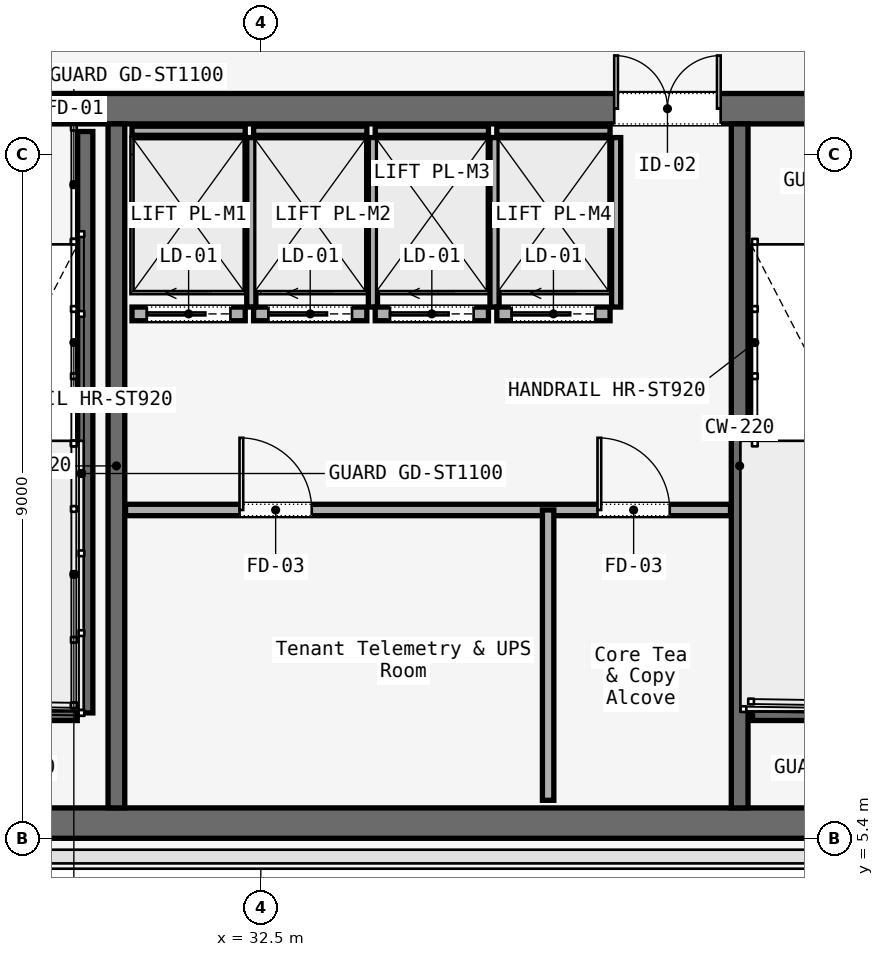
"""IFC4 building model, lengths in metres.
Left out: names, types, materials, properties, quantities, classifications, styles, units other than length and angle.
Written with IfcOpenShell. Run it as: python <this file> out.ifc"""

import sys

from ifc_helpers import new_model, si_unit, direction, frame, frame_2d, origin, place, context, subcontext, project, spatial, rectangle, extrude, element, fill, save


model = new_model("IFC4")
c1 = context("Model", 3, precision=1e-05, world=origin(), true_north=direction((0.0, 1.0)))
c2 = subcontext(c1, "Body", "Model", "MODEL_VIEW")
j1 = project(units=[si_unit("LENGTHUNIT", "METRE"), si_unit("PLANEANGLEUNIT", "RADIAN")], contexts=[c1])
p1 = place(None, origin())
s1 = spatial("IfcSite", under=j1, at=p1, CompositionType="ELEMENT")
p2 = place(p1, origin())
s2 = spatial("IfcBuilding", under=s1, at=p2, CompositionType="ELEMENT")
p3 = place(p2, frame((0.0, 0.0, 187.8)))
s3 = spatial("IfcBuildingStorey", under=s2, at=p3, CompositionType="ELEMENT", Elevation=187.8)
p4 = place(p3, frame((26.45, 15.0, 0.0), z_axis=(0.0, 0.0, 1.0), x_axis=(1.0, 0.0, 0.0)))
e1 = element("IfcWall", 1, at=p4, inside=s3, PredefinedType="SOLIDWALL", context=c2, shape_type="SweptSolid", body=[
    extrude(rectangle(XDim=31.1, YDim=0.4, at=frame_2d((15.55, 0.0))), origin(), (0.0, 0.0, 1.0), 3.58),
])
p5 = place(p4, frame((1.65, 0.0, 0.0)))
e2 = element("IfcOpeningElement", 2, at=p5, cuts=e1, PredefinedType="OPENING", context=c2, shape_type="SweptSolid", body=[
    extrude(rectangle(XDim=1.1, YDim=2.2, at=frame_2d((0.55, 1.1))), frame((0.0, 0.2, 0.0), z_axis=(0.0, -1.0, 0.0), x_axis=(1.0, 0.0, 0.0)), (0.0, 0.0, 1.0), 0.4),
])
p6 = place(p4, frame((13.65, 0.0, 0.0)))
e3 = element("IfcOpeningElement", 3, at=p6, cuts=e1, PredefinedType="OPENING", context=c2, shape_type="SweptSolid", body=[
    extrude(rectangle(XDim=1.1, YDim=2.2, at=frame_2d((0.55, 1.1))), frame((0.0, 0.2, 0.0), z_axis=(0.0, -1.0, 0.0), x_axis=(1.0, 0.0, 0.0)), (0.0, 0.0, 1.0), 0.4),
])
p7 = place(p4, frame((25.55, 0.0, 0.0)))
e4 = element("IfcOpeningElement", 4, at=p7, cuts=e1, PredefinedType="OPENING", context=c2, shape_type="SweptSolid", body=[
    extrude(rectangle(XDim=1.1, YDim=2.2, at=frame_2d((0.55, 1.1))), frame((0.0, 0.2, 0.0), z_axis=(0.0, -1.0, 0.0), x_axis=(1.0, 0.0, 0.0)), (0.0, 0.0, 1.0), 0.4),
])
p8 = place(p4, frame((10.7, 0.0, 0.0)))
e5 = element("IfcOpeningElement", 5, at=p8, cuts=e1, PredefinedType="OPENING", context=c2, shape_type="SweptSolid", body=[
    extrude(rectangle(XDim=1.4, YDim=2.2, at=frame_2d((0.7, 1.1))), frame((0.0, 0.2, 0.0), z_axis=(0.0, -1.0, 0.0), x_axis=(1.0, 0.0, 0.0)), (0.0, 0.0, 1.0), 0.4),
])
p9 = place(p4, frame((19.35, 0.0, 0.0)))
e6 = element("IfcOpeningElement", 6, at=p9, cuts=e1, PredefinedType="OPENING", context=c2, shape_type="SweptSolid", body=[
    extrude(rectangle(XDim=1.1, YDim=2.2, at=frame_2d((0.55, 1.1))), frame((0.0, 0.2, 0.0), z_axis=(0.0, -1.0, 0.0), x_axis=(1.0, 0.0, 0.0)), (0.0, 0.0, 1.0), 0.4),
])
p10 = place(p4, frame((21.4, 0.0, 0.0)))
e7 = element("IfcOpeningElement", 7, at=p10, cuts=e1, PredefinedType="OPENING", context=c2, shape_type="SweptSolid", body=[
    extrude(rectangle(XDim=0.9, YDim=2.1, at=frame_2d((0.45, 1.05))), frame((0.0, 0.2, 0.0), z_axis=(0.0, -1.0, 0.0), x_axis=(1.0, 0.0, 0.0)), (0.0, 0.0, 1.0), 0.4),
])
p11 = place(p4, frame((23.35, 0.0, 0.0)))
e8 = element("IfcOpeningElement", 8, at=p11, cuts=e1, PredefinedType="OPENING", context=c2, shape_type="SweptSolid", body=[
    extrude(rectangle(XDim=1.3, YDim=2.3, at=frame_2d((0.65, 1.15))), frame((0.0, 0.2, 0.0), z_axis=(0.0, -1.0, 0.0), x_axis=(1.0, 0.0, 0.0)), (0.0, 0.0, 1.0), 0.4),
])
p12 = place(p3, frame((26.45, 5.6, 0.0), z_axis=(0.0, 0.0, 1.0), x_axis=(1.0, 0.0, 0.0)))
e9 = element("IfcWall", 9, at=p12, inside=s3, PredefinedType="SOLIDWALL", context=c2, shape_type="SweptSolid", body=[
    extrude(rectangle(XDim=31.1, YDim=0.4, at=frame_2d((15.55, 0.0))), origin(), (0.0, 0.0, 1.0), 3.58),
])
for number, where, z_axis, x_axis in (
    (10, (30.6, 5.8, 0.0), (0.0, 0.0, 1.0), (0.0, 1.0, 0.0)),
    (11, (38.8, 5.8, 0.0), (0.0, 0.0, 1.0), (0.0, 1.0, 0.0)),
):
    element("IfcWall", number, at=place(p3, frame(where, z_axis=z_axis, x_axis=x_axis)), inside=s3, PredefinedType="SOLIDWALL", context=c2, shape_type="SweptSolid", body=[
        extrude(rectangle(XDim=9.0, YDim=0.22, at=frame_2d((4.5, 0.0))), origin(), (0.0, 0.0, 1.0), 3.58),
    ])
p13 = place(p3, frame((30.19, 14.7, 0.0), z_axis=(0.0, 0.0, 1.0), x_axis=(0.0, -1.0, 0.0)))
e12 = element("IfcWall", 12, at=p13, inside=s3, PredefinedType="SOLIDWALL", context=c2, shape_type="SweptSolid", body=[
    extrude(rectangle(XDim=7.65, YDim=0.2, at=frame_2d((3.825, 0.0))), origin(), (0.0, 0.0, 1.0), 3.8),
])
for number, where, z_axis, x_axis in (
    (13, (26.97, 7.05, 0.0), (0.0, 0.0, 1.0), (1.0, 0.0, 0.0)),
    (14, (38.97, 7.05, 0.0), (0.0, 0.0, 1.0), (1.0, 0.0, 0.0)),
):
    element("IfcWall", number, at=place(p3, frame(where, z_axis=z_axis, x_axis=x_axis)), inside=s3, PredefinedType="SOLIDWALL", context=c2, shape_type="SweptSolid", body=[
        extrude(rectangle(XDim=3.115, YDim=0.2, at=frame_2d((1.558, 0.0))), origin(), (0.0, 0.0, 1.0), 3.8),
    ])
p14 = place(p3, frame((30.72, 9.72, 0.0), z_axis=(0.0, 0.0, 1.0), x_axis=(1.0, 0.0, 0.0)))
e15 = element("IfcWall", 15, at=p14, inside=s3, PredefinedType="PARTITIONING", context=c2, shape_type="SweptSolid", body=[
    extrude(rectangle(XDim=7.96, YDim=0.15, at=frame_2d((3.98, 0.0))), origin(), (0.0, 0.0, 1.0), 3.01),
])
p15 = place(p14, frame((1.5, 0.0, 0.0)))
e16 = element("IfcOpeningElement", 16, at=p15, cuts=e15, PredefinedType="OPENING", context=c2, shape_type="SweptSolid", body=[
    extrude(rectangle(XDim=0.95, YDim=2.2, at=frame_2d((0.475, 1.1))), frame((0.0, 0.075, 0.0), z_axis=(0.0, -1.0, 0.0), x_axis=(1.0, 0.0, 0.0)), (0.0, 0.0, 1.0), 0.15),
])
p16 = place(p14, frame((6.21, 0.0, 0.0)))
e17 = element("IfcOpeningElement", 17, at=p16, cuts=e15, PredefinedType="OPENING", context=c2, shape_type="SweptSolid", body=[
    extrude(rectangle(XDim=0.95, YDim=2.2, at=frame_2d((0.475, 1.1))), frame((0.0, 0.075, 0.0), z_axis=(0.0, -1.0, 0.0), x_axis=(1.0, 0.0, 0.0)), (0.0, 0.0, 1.0), 0.15),
])
p17 = place(p3, frame((36.28, 5.9, 0.0), z_axis=(0.0, 0.0, 1.0), x_axis=(0.0, 1.0, 0.0)))
e18 = element("IfcWall", 18, at=p17, inside=s3, PredefinedType="PARTITIONING", context=c2, shape_type="SweptSolid", body=[
    extrude(rectangle(XDim=3.82, YDim=0.15, at=frame_2d((1.91, 0.0))), origin(), (0.0, 0.0, 1.0), 3.01),
])
p18 = place(p3, frame((30.805, 12.3, 0.0), z_axis=(0.0, 0.0, 1.0), x_axis=(1.0, 0.0, 0.0)))
e19 = element("IfcWall", 19, at=p18, inside=s3, PredefinedType="SOLIDWALL", context=c2, shape_type="SweptSolid", body=[
    extrude(rectangle(XDim=1.49, YDim=0.18, at=frame_2d((0.745, 0.0))), origin(), (0.0, 0.0, 1.0), 3.01),
])
p19 = place(p18, frame((0.195, 0.0, 0.0)))
e20 = element("IfcOpeningElement", 20, at=p19, cuts=e19, PredefinedType="OPENING", context=c2, shape_type="SweptSolid", body=[
    extrude(rectangle(XDim=1.1, YDim=2.2, at=frame_2d((0.55, 1.1))), frame((0.0, 0.09, 0.0), z_axis=(0.0, -1.0, 0.0), x_axis=(1.0, 0.0, 0.0)), (0.0, 0.0, 1.0), 0.18),
])
p20 = place(p3, frame((30.805, 14.71, 0.0), z_axis=(0.0, 0.0, 1.0), x_axis=(1.0, 0.0, 0.0)))
e21 = element("IfcWall", 21, at=p20, inside=s3, PredefinedType="SOLIDWALL", context=c2, shape_type="SweptSolid", body=[
    extrude(rectangle(XDim=1.49, YDim=0.12, at=frame_2d((0.745, 0.0))), origin(), (0.0, 0.0, 1.0), 3.01),
])
p21 = place(p3, frame((32.375, 12.39, 0.0), z_axis=(0.0, 0.0, 1.0), x_axis=(0.0, 1.0, 0.0)))
e22 = element("IfcWall", 22, at=p21, inside=s3, PredefinedType="SOLIDWALL", context=c2, shape_type="SweptSolid", body=[
    extrude(rectangle(XDim=2.23, YDim=0.12, at=frame_2d((1.115, 0.0))), origin(), (0.0, 0.0, 1.0), 3.01),
])
p22 = place(p3, frame((32.405, 12.3, 0.0), z_axis=(0.0, 0.0, 1.0), x_axis=(1.0, 0.0, 0.0)))
e23 = element("IfcWall", 23, at=p22, inside=s3, PredefinedType="SOLIDWALL", context=c2, shape_type="SweptSolid", body=[
    extrude(rectangle(XDim=1.49, YDim=0.18, at=frame_2d((0.745, 0.0))), origin(), (0.0, 0.0, 1.0), 3.01),
])
p23 = place(p22, frame((0.195, 0.0, 0.0)))
e24 = element("IfcOpeningElement", 24, at=p23, cuts=e23, PredefinedType="OPENING", context=c2, shape_type="SweptSolid", body=[
    extrude(rectangle(XDim=1.1, YDim=2.2, at=frame_2d((0.55, 1.1))), frame((0.0, 0.09, 0.0), z_axis=(0.0, -1.0, 0.0), x_axis=(1.0, 0.0, 0.0)), (0.0, 0.0, 1.0), 0.18),
])
p24 = place(p3, frame((32.405, 14.71, 0.0), z_axis=(0.0, 0.0, 1.0), x_axis=(1.0, 0.0, 0.0)))
e25 = element("IfcWall", 25, at=p24, inside=s3, PredefinedType="SOLIDWALL", context=c2, shape_type="SweptSolid", body=[
    extrude(rectangle(XDim=1.49, YDim=0.12, at=frame_2d((0.745, 0.0))), origin(), (0.0, 0.0, 1.0), 3.01),
])
p25 = place(p3, frame((33.975, 12.39, 0.0), z_axis=(0.0, 0.0, 1.0), x_axis=(0.0, 1.0, 0.0)))
e26 = element("IfcWall", 26, at=p25, inside=s3, PredefinedType="SOLIDWALL", context=c2, shape_type="SweptSolid", body=[
    extrude(rectangle(XDim=2.23, YDim=0.12, at=frame_2d((1.115, 0.0))), origin(), (0.0, 0.0, 1.0), 3.01),
])
p26 = place(p3, frame((34.005, 12.3, 0.0), z_axis=(0.0, 0.0, 1.0), x_axis=(1.0, 0.0, 0.0)))
e27 = element("IfcWall", 27, at=p26, inside=s3, PredefinedType="SOLIDWALL", context=c2, shape_type="SweptSolid", body=[
    extrude(rectangle(XDim=1.49, YDim=0.18, at=frame_2d((0.745, 0.0))), origin(), (0.0, 0.0, 1.0), 3.01),
])
p27 = place(p26, frame((0.195, 0.0, 0.0)))
e28 = element("IfcOpeningElement", 28, at=p27, cuts=e27, PredefinedType="OPENING", context=c2, shape_type="SweptSolid", body=[
    extrude(rectangle(XDim=1.1, YDim=2.2, at=frame_2d((0.55, 1.1))), frame((0.0, 0.09, 0.0), z_axis=(0.0, -1.0, 0.0), x_axis=(1.0, 0.0, 0.0)), (0.0, 0.0, 1.0), 0.18),
])
p28 = place(p3, frame((34.005, 14.71, 0.0), z_axis=(0.0, 0.0, 1.0), x_axis=(1.0, 0.0, 0.0)))
e29 = element("IfcWall", 29, at=p28, inside=s3, PredefinedType="SOLIDWALL", context=c2, shape_type="SweptSolid", body=[
    extrude(rectangle(XDim=1.49, YDim=0.12, at=frame_2d((0.745, 0.0))), origin(), (0.0, 0.0, 1.0), 3.01),
])
p29 = place(p3, frame((35.575, 12.39, 0.0), z_axis=(0.0, 0.0, 1.0), x_axis=(0.0, 1.0, 0.0)))
e30 = element("IfcWall", 30, at=p29, inside=s3, PredefinedType="SOLIDWALL", context=c2, shape_type="SweptSolid", body=[
    extrude(rectangle(XDim=2.23, YDim=0.12, at=frame_2d((1.115, 0.0))), origin(), (0.0, 0.0, 1.0), 3.01),
])
p30 = place(p3, frame((35.605, 12.3, 0.0), z_axis=(0.0, 0.0, 1.0), x_axis=(1.0, 0.0, 0.0)))
e31 = element("IfcWall", 31, at=p30, inside=s3, PredefinedType="SOLIDWALL", context=c2, shape_type="SweptSolid", body=[
    extrude(rectangle(XDim=1.49, YDim=0.18, at=frame_2d((0.745, 0.0))), origin(), (0.0, 0.0, 1.0), 3.01),
])
p31 = place(p30, frame((0.195, 0.0, 0.0)))
e32 = element("IfcOpeningElement", 32, at=p31, cuts=e31, PredefinedType="OPENING", context=c2, shape_type="SweptSolid", body=[
    extrude(rectangle(XDim=1.1, YDim=2.2, at=frame_2d((0.55, 1.1))), frame((0.0, 0.09, 0.0), z_axis=(0.0, -1.0, 0.0), x_axis=(1.0, 0.0, 0.0)), (0.0, 0.0, 1.0), 0.18),
])
p32 = place(p3, frame((35.605, 14.71, 0.0), z_axis=(0.0, 0.0, 1.0), x_axis=(1.0, 0.0, 0.0)))
e33 = element("IfcWall", 33, at=p32, inside=s3, PredefinedType="SOLIDWALL", context=c2, shape_type="SweptSolid", body=[
    extrude(rectangle(XDim=1.49, YDim=0.12, at=frame_2d((0.745, 0.0))), origin(), (0.0, 0.0, 1.0), 3.01),
])
p33 = place(p3, frame((37.175, 12.39, 0.0), z_axis=(0.0, 0.0, 1.0), x_axis=(0.0, 1.0, 0.0)))
e34 = element("IfcWall", 34, at=p33, inside=s3, PredefinedType="SOLIDWALL", context=c2, shape_type="SweptSolid", body=[
    extrude(rectangle(XDim=2.23, YDim=0.12, at=frame_2d((1.115, 0.0))), origin(), (0.0, 0.0, 1.0), 3.01),
])
p34 = place(p8, origin())
e35 = element("IfcDoor", 35, at=p34, inside=s3, OperationType="DOUBLE_DOOR_SINGLE_SWING", PredefinedType="DOOR", context=c2, shape_type="SweptSolid", body=[
    extrude(rectangle(XDim=1.4, YDim=2.2, at=frame_2d((0.7, 1.1))), frame((0.0, 0.025, 0.0), z_axis=(0.0, -1.0, 0.0), x_axis=(1.0, 0.0, 0.0)), (0.0, 0.0, 1.0), 0.05),
])
fill(e5, e35)
p35 = place(p15, origin())
e36 = element("IfcDoor", 36, at=p35, inside=s3, OperationType="SINGLE_SWING_LEFT", PredefinedType="DOOR", context=c2, shape_type="SweptSolid", body=[
    extrude(rectangle(XDim=0.95, YDim=2.2, at=frame_2d((0.475, 1.1))), frame((0.0, 0.025, 0.0), z_axis=(0.0, -1.0, 0.0), x_axis=(1.0, 0.0, 0.0)), (0.0, 0.0, 1.0), 0.05),
])
fill(e16, e36)
p36 = place(p16, origin())
e37 = element("IfcDoor", 37, at=p36, inside=s3, OperationType="SINGLE_SWING_RIGHT", PredefinedType="DOOR", context=c2, shape_type="SweptSolid", body=[
    extrude(rectangle(XDim=0.95, YDim=2.2, at=frame_2d((0.475, 1.1))), frame((0.0, 0.025, 0.0), z_axis=(0.0, -1.0, 0.0), x_axis=(1.0, 0.0, 0.0)), (0.0, 0.0, 1.0), 0.05),
])
fill(e17, e37)
p37 = place(p19, origin())
e38 = element("IfcDoor", 38, at=p37, inside=s3, OperationType="SLIDING_TO_LEFT", PredefinedType="DOOR", context=c2, shape_type="SweptSolid", body=[
    extrude(rectangle(XDim=1.1, YDim=2.2, at=frame_2d((0.55, 1.1))), frame((0.0, 0.025, 0.0), z_axis=(0.0, -1.0, 0.0), x_axis=(1.0, 0.0, 0.0)), (0.0, 0.0, 1.0), 0.05),
])
fill(e20, e38)
p38 = place(p23, origin())
e39 = element("IfcDoor", 39, at=p38, inside=s3, OperationType="SLIDING_TO_LEFT", PredefinedType="DOOR", context=c2, shape_type="SweptSolid", body=[
    extrude(rectangle(XDim=1.1, YDim=2.2, at=frame_2d((0.55, 1.1))), frame((0.0, 0.025, 0.0), z_axis=(0.0, -1.0, 0.0), x_axis=(1.0, 0.0, 0.0)), (0.0, 0.0, 1.0), 0.05),
])
fill(e24, e39)
p39 = place(p27, origin())
e40 = element("IfcDoor", 40, at=p39, inside=s3, OperationType="SLIDING_TO_LEFT", PredefinedType="DOOR", context=c2, shape_type="SweptSolid", body=[
    extrude(rectangle(XDim=1.1, YDim=2.2, at=frame_2d((0.55, 1.1))), frame((0.0, 0.025, 0.0), z_axis=(0.0, -1.0, 0.0), x_axis=(1.0, 0.0, 0.0)), (0.0, 0.0, 1.0), 0.05),
])
fill(e28, e40)
p40 = place(p31, origin())
e41 = element("IfcDoor", 41, at=p40, inside=s3, OperationType="SLIDING_TO_LEFT", PredefinedType="DOOR", context=c2, shape_type="SweptSolid", body=[
    extrude(rectangle(XDim=1.1, YDim=2.2, at=frame_2d((0.55, 1.1))), frame((0.0, 0.025, 0.0), z_axis=(0.0, -1.0, 0.0), x_axis=(1.0, 0.0, 0.0)), (0.0, 0.0, 1.0), 0.05),
])
fill(e32, e41)
save(model, sys.argv[1])
